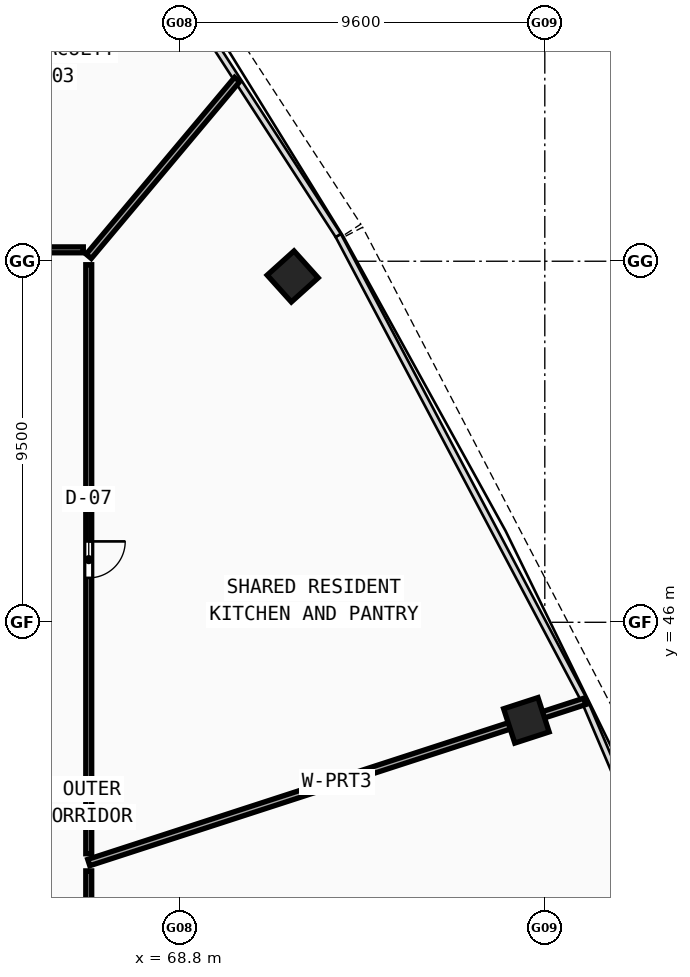
"""IFC4 building model, lengths in metres.
Left out: names, types, materials, properties, quantities, classifications, styles, units other than length and angle.
Written with IfcOpenShell. Run it as: python <this file> out.ifc"""

import sys

from ifc_helpers import new_model, si_unit, direction, frame, frame_2d, origin, origin_with_axes, origin_2d, place, context, subcontext, project, spatial, rectangle, hollow_rectangle, extrude, source, transform, mapped, element, fill, save


model = new_model("IFC4")
c1 = context("Model", 3, precision=1e-05, world=origin(), true_north=direction((0.0, 1.0)))
c2 = subcontext(c1, "Body", "Model", "MODEL_VIEW")
j1 = project(units=[si_unit("LENGTHUNIT", "METRE"), si_unit("PLANEANGLEUNIT", "RADIAN")], contexts=[c1])
p1 = place(None, origin())
s1 = spatial("IfcSite", under=j1, at=p1, CompositionType="ELEMENT")
p2 = place(p1, origin())
s2 = spatial("IfcBuilding", under=s1, at=p2, CompositionType="ELEMENT")
p3 = place(p2, frame((0.0, 0.0, 148.23)))
s3 = spatial("IfcBuildingStorey", under=s2, at=p3, CompositionType="ELEMENT", Elevation=148.23)
m1 = source(origin(), c2, "Body", "SweptSolid", [
    extrude(hollow_rectangle(XDim=0.95, YDim=0.95, WallThickness=0.04, at=origin_2d()), origin(), (0.0, 0.0, 1.0), 3.68),
])
for number, where, z_axis, x_axis in (
    (1, (77.915, 43.42, -0.26), (0.0, 0.0, 1.0), (-0.309, 0.951, 0.0)),
    (2, (71.766, 55.099, -0.26), (0.0, 0.0, 1.0), (-0.669, 0.743, 0.0)),
):
    element("IfcColumn", number, at=place(p3, frame(where, z_axis=z_axis, x_axis=x_axis)), inside=s3, PredefinedType="COLUMN", context=c2, shape_type="MappedRepresentation", body=[
        mapped(m1, transform((0.0, 0.0, 0.0), scale=1.0)),
    ])
p4 = place(p3, frame((66.4, 39.678, 0.0), z_axis=(0.0, 0.0, 1.0), x_axis=(0.951057598357, 0.309013664112, 0.0)))
e3 = element("IfcWall", 3, at=p4, inside=s3, PredefinedType="PARTITIONING", context=c2, shape_type="SweptSolid", body=[
    extrude(rectangle(XDim=13.723, YDim=0.175, at=frame_2d((6.862, 0.0))), origin(), (0.0, 0.0, 1.0), 2.77),
])
p5 = place(p3, frame((66.4, 55.628, 0.0), z_axis=(0.0, 0.0, 1.0), x_axis=(0.642804736834, 0.766030071409, 0.0)))
e4 = element("IfcWall", 4, at=p5, inside=s3, PredefinedType="PARTITIONING", context=c2, shape_type="SweptSolid", body=[
    extrude(rectangle(XDim=6.076, YDim=0.175, at=frame_2d((3.038, 0.0))), origin(), (0.0, 0.0, 1.0), 2.77),
])
p6 = place(p3, frame((58.08, 55.8, 0.0), z_axis=(0.0, 0.0, 1.0), x_axis=(1.0, 0.0, 0.0)))
e5 = element("IfcWall", 5, at=p6, inside=s3, PredefinedType="PARTITIONING", context=c2, shape_type="SweptSolid", body=[
    extrude(rectangle(XDim=8.177, YDim=0.155, at=frame_2d((4.088, 0.0))), origin(), (0.0, 0.0, 1.0), 3.02),
])
p7 = place(p6, frame((3.596, 0.0, 0.0)))
e6 = element("IfcOpeningElement", 6, at=p7, cuts=e5, PredefinedType="OPENING", context=c2, shape_type="SweptSolid", body=[
    extrude(rectangle(XDim=0.92, YDim=2.1, at=frame_2d((0.46, 1.05))), frame((0.0, 0.087, 0.0), z_axis=(0.0, -1.0, 0.0), x_axis=(1.0, 0.0, 0.0)), (0.0, 0.0, 1.0), 0.175),
])
p8 = place(p3, frame((66.4, 55.408, 0.0), z_axis=(0.0, 0.0, 1.0), x_axis=(0.0, -1.0, 0.0)))
e7 = element("IfcWall", 7, at=p8, inside=s3, PredefinedType="PARTITIONING", context=c2, shape_type="SweptSolid", body=[
    extrude(rectangle(XDim=15.499, YDim=0.155, at=frame_2d((7.749, 0.0))), origin(), (0.0, 0.0, 1.0), 2.77),
])
p9 = place(p8, frame((7.28, 0.0, 0.0)))
e8 = element("IfcOpeningElement", 8, at=p9, cuts=e7, PredefinedType="OPENING", context=c2, shape_type="SweptSolid", body=[
    extrude(rectangle(XDim=0.96, YDim=2.12, at=frame_2d((0.48, 1.06))), frame((0.0, 0.087, 0.0), z_axis=(0.0, -1.0, 0.0), x_axis=(1.0, 0.0, 0.0)), (0.0, 0.0, 1.0), 0.175),
])
p10 = place(p3, frame((66.4, 39.459, 0.0), z_axis=(0.0, 0.0, 1.0), x_axis=(0.0, -1.0, 0.0)))
e9 = element("IfcWall", 9, at=p10, inside=s3, PredefinedType="PARTITIONING", context=c2, shape_type="SweptSolid", body=[
    extrude(rectangle(XDim=8.783, YDim=0.155, at=frame_2d((4.392, 0.0))), origin(), (0.0, 0.0, 1.0), 3.42),
])
p11 = place(p10, frame((3.932, 0.0, 0.0)))
e10 = element("IfcOpeningElement", 10, at=p11, cuts=e9, PredefinedType="OPENING", context=c2, shape_type="SweptSolid", body=[
    extrude(rectangle(XDim=0.92, YDim=2.1, at=frame_2d((0.46, 1.05))), frame((0.0, 0.087, 0.0), z_axis=(0.0, -1.0, 0.0), x_axis=(1.0, 0.0, 0.0)), (0.0, 0.0, 1.0), 0.175),
])
m2 = source(origin(), c2, "Body", "SweptSolid", [
    extrude(rectangle(XDim=0.96, YDim=2.12, at=frame_2d((0.48, 1.06))), frame((0.0, 0.025, 0.0), z_axis=(0.0, -1.0, 0.0), x_axis=(1.0, 0.0, 0.0)), (0.0, 0.0, 1.0), 0.05),
])
p12 = place(p9, origin_with_axes())
e11 = element("IfcDoor", 11, at=p12, inside=s3, OperationType="SINGLE_SWING_LEFT", PredefinedType="DOOR", context=c2, shape_type="MappedRepresentation", body=[
    mapped(m2, transform((0.0, 0.0, 0.0), scale=1.0)),
])
fill(e8, e11)
save(model, sys.argv[1])
